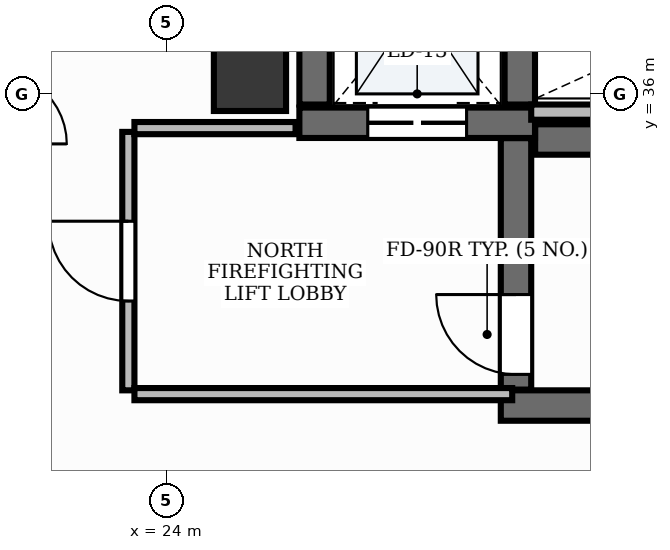
"""IFC4 building model, lengths in metres.
Left out: names, types, materials, properties, quantities, classifications, styles, units other than length and angle.
Written with IfcOpenShell. Run it as: python <this file> out.ifc"""

import sys

from ifc_helpers import new_model, si_unit, direction, frame, frame_2d, origin, origin_2d, place, context, subcontext, project, spatial, rectangle, extrude, element, fill, save


model = new_model("IFC4")
c1 = context("Model", 3, precision=1e-05, world=origin(), true_north=direction((0.0, 1.0)))
c2 = subcontext(c1, "Body", "Model", "MODEL_VIEW")
j1 = project(units=[si_unit("LENGTHUNIT", "METRE"), si_unit("PLANEANGLEUNIT", "RADIAN")], contexts=[c1])
p1 = place(None, origin())
s1 = spatial("IfcSite", under=j1, at=p1, CompositionType="ELEMENT")
p2 = place(p1, origin())
s2 = spatial("IfcBuilding", under=s1, at=p2, CompositionType="ELEMENT")
p3 = place(p2, frame((0.0, 0.0, 256.2)))
s3 = spatial("IfcBuildingStorey", under=s2, at=p3, CompositionType="ELEMENT", Elevation=256.2)
p4 = place(p3, frame((28.852, 35.4, 0.0), z_axis=(0.0, 0.0, 1.0), x_axis=(1.0, 0.0, 0.0)))
e1 = element("IfcWall", 1, at=p4, inside=s3, PredefinedType="SHEAR", context=c2, shape_type="SweptSolid", body=[
    extrude(rectangle(XDim=8.198, YDim=0.4, at=frame_2d((4.099, 0.0))), origin(), (0.0, 0.0, 1.0), 3.9),
])
p5 = place(p3, frame((28.4, 31.9, 0.0), z_axis=(0.0, 0.0, 1.0), x_axis=(1.0, 0.0, 0.0)))
e2 = element("IfcWall", 2, at=p5, inside=s3, PredefinedType="SHEAR", context=c2, shape_type="SweptSolid", body=[
    extrude(rectangle(XDim=8.65, YDim=0.4, at=frame_2d((4.325, 0.0))), origin(), (0.0, 0.0, 1.0), 3.9),
])
p6 = place(p3, frame((28.6, 32.11, 0.0), z_axis=(0.0, 0.0, 1.0), x_axis=(0.0, 1.0, 0.0)))
e3 = element("IfcWall", 3, at=p6, inside=s3, PredefinedType="SHEAR", context=c2, shape_type="SweptSolid", body=[
    extrude(rectangle(XDim=3.308, YDim=0.4, at=frame_2d((1.654, 0.0))), origin(), (0.0, 0.0, 1.0), 3.9),
])
p7 = place(p6, frame((0.2, 0.0, 0.0)))
e4 = element("IfcOpeningElement", 4, at=p7, cuts=e3, PredefinedType="OPENING", context=c2, shape_type="SweptSolid", body=[
    extrude(rectangle(XDim=1.05, YDim=2.15, at=frame_2d((0.525, 1.075))), frame((0.0, 0.215, 0.0), z_axis=(0.0, -1.0, 0.0), x_axis=(1.0, 0.0, 0.0)), (0.0, 0.0, 1.0), 0.43),
])
p8 = place(p3, frame((25.75, 35.62, 0.0), z_axis=(0.0, 0.0, 1.0), x_axis=(1.0, 0.0, 0.0)))
e5 = element("IfcWall", 5, at=p8, inside=s3, PredefinedType="SHEAR", context=c2, shape_type="SweptSolid", body=[
    extrude(rectangle(XDim=3.1, YDim=0.4, at=frame_2d((1.55, 0.0))), origin(), (0.0, 0.0, 1.0), 3.9),
])
p9 = place(p8, frame((0.9, 0.0, 0.0)))
e6 = element("IfcOpeningElement", 6, at=p9, cuts=e5, PredefinedType="OPENING", context=c2, shape_type="SweptSolid", body=[
    extrude(rectangle(XDim=1.3, YDim=2.2, at=frame_2d((0.65, 1.1))), frame((0.0, 0.215, 0.0), z_axis=(0.0, -1.0, 0.0), x_axis=(1.0, 0.0, 0.0)), (0.0, 0.0, 1.0), 0.43),
])
for number, where, z_axis, x_axis in (
    (7, (25.95, 35.86, 0.0), (0.0, 0.0, 1.0), (0.0, 1.0, 0.0)),
    (8, (28.65, 35.86, 0.0), (0.0, 0.0, 1.0), (0.0, 1.0, 0.0)),
):
    element("IfcWall", number, at=place(p3, frame(where, z_axis=z_axis, x_axis=x_axis)), inside=s3, PredefinedType="SHEAR", context=c2, shape_type="SweptSolid", body=[
        extrude(rectangle(XDim=2.7, YDim=0.4, at=frame_2d((1.35, 0.0))), origin(), (0.0, 0.0, 1.0), 3.9),
    ])
p10 = place(p3, frame((25.1, 36.25, -0.0), z_axis=(0.0, 0.0, 1.0), x_axis=(1.0, 0.0, 0.0)))
e9 = element("IfcColumn", 9, at=p10, inside=s3, PredefinedType="PILASTER", context=c2, shape_type="SweptSolid", body=[
    extrude(rectangle(XDim=0.95, YDim=0.95, at=origin_2d()), origin(), (0.0, 0.0, 1.0), 3.901),
])
p11 = place(p3, frame((28.8, 35.76, 0.0), z_axis=(0.0, 0.0, 1.0), x_axis=(1.0, 0.0, 0.0)))
e10 = element("IfcWall", 10, at=p11, inside=s3, PredefinedType="PARTITIONING", context=c2, shape_type="SweptSolid", body=[
    extrude(rectangle(XDim=4.57, YDim=0.2, at=frame_2d((2.285, 0.0))), origin(), (0.0, 0.0, 1.0), 2.22),
])
p12 = place(p3, frame((23.5, 32.1, 0.0), z_axis=(0.0, 0.0, 1.0), x_axis=(0.0, 1.0, 0.0)))
e11 = element("IfcWall", 11, at=p12, inside=s3, PredefinedType="PARTITIONING", context=c2, shape_type="SweptSolid", body=[
    extrude(rectangle(XDim=3.4, YDim=0.16, at=frame_2d((1.7, 0.0))), origin(), (0.0, 0.0, 1.0), 2.22),
])
p13 = place(p12, frame((1.175, 0.0, 0.0)))
e12 = element("IfcOpeningElement", 12, at=p13, cuts=e11, PredefinedType="OPENING", context=c2, shape_type="SweptSolid", body=[
    extrude(rectangle(XDim=1.05, YDim=2.15, at=frame_2d((0.525, 1.075))), frame((0.0, 0.095, 0.0), z_axis=(0.0, -1.0, 0.0), x_axis=(1.0, 0.0, 0.0)), (0.0, 0.0, 1.0), 0.19),
])
p14 = place(p3, frame((23.58, 32.05, 0.0), z_axis=(0.0, 0.0, 1.0), x_axis=(1.0, 0.0, 0.0)))
e13 = element("IfcWall", 13, at=p14, inside=s3, PredefinedType="PARTITIONING", context=c2, shape_type="SweptSolid", body=[
    extrude(rectangle(XDim=4.97, YDim=0.16, at=frame_2d((2.485, 0.0))), origin(), (0.0, 0.0, 1.0), 2.22),
])
p15 = place(p3, frame((23.58, 35.55, 0.0), z_axis=(0.0, 0.0, 1.0), x_axis=(1.0, 0.0, 0.0)))
e14 = element("IfcWall", 14, at=p15, inside=s3, PredefinedType="PARTITIONING", context=c2, shape_type="SweptSolid", body=[
    extrude(rectangle(XDim=2.12, YDim=0.16, at=frame_2d((1.06, 0.0))), origin(), (0.0, 0.0, 1.0), 2.22),
])
p16 = place(p7, origin())
e15 = element("IfcDoor", 15, at=p16, inside=s3, OperationType="SINGLE_SWING_RIGHT", PredefinedType="DOOR", context=c2, shape_type="SweptSolid", body=[
    extrude(rectangle(XDim=1.05, YDim=2.15, at=frame_2d((0.525, 1.075))), frame((0.0, 0.025, 0.0), z_axis=(0.0, -1.0, 0.0), x_axis=(1.0, 0.0, 0.0)), (0.0, 0.0, 1.0), 0.05),
])
fill(e4, e15)
p17 = place(p9, origin())
e16 = element("IfcDoor", 16, at=p17, inside=s3, OperationType="DOUBLE_DOOR_SLIDING", PredefinedType="DOOR", context=c2, shape_type="SweptSolid", body=[
    extrude(rectangle(XDim=1.3, YDim=2.2, at=frame_2d((0.65, 1.1))), frame((0.0, 0.025, 0.0), z_axis=(0.0, -1.0, 0.0), x_axis=(1.0, 0.0, 0.0)), (0.0, 0.0, 1.0), 0.05),
])
fill(e6, e16)
p18 = place(p13, origin())
e17 = element("IfcDoor", 17, at=p18, inside=s3, OperationType="SINGLE_SWING_RIGHT", PredefinedType="DOOR", context=c2, shape_type="SweptSolid", body=[
    extrude(rectangle(XDim=1.05, YDim=2.15, at=frame_2d((0.525, 1.075))), frame((0.0, 0.025, 0.0), z_axis=(0.0, -1.0, 0.0), x_axis=(1.0, 0.0, 0.0)), (0.0, 0.0, 1.0), 0.05),
])
fill(e12, e17)
save(model, sys.argv[1])
